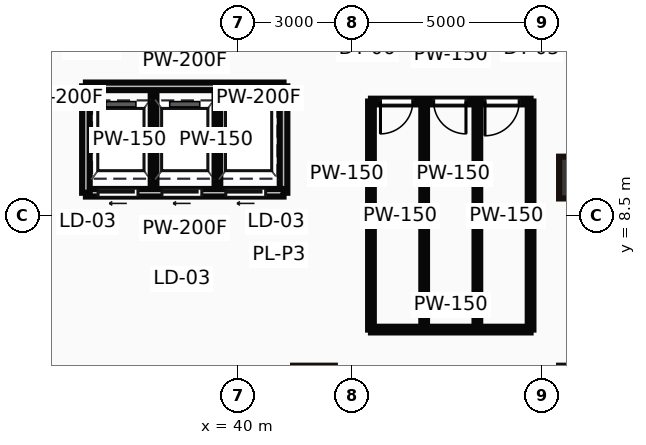
"""IFC4 building model, lengths in metres.
Left out: names, types, materials, properties, quantities, classifications, styles, units other than length and angle.
Written with IfcOpenShell. Run it as: python <this file> out.ifc"""

import sys

from ifc_helpers import new_model, si_unit, direction, frame, frame_2d, origin, origin_2d, place, context, subcontext, project, spatial, rectangle, hollow_rectangle, extrude, source, transform, mapped, element, fill, save


model = new_model("IFC4")
c1 = context("Model", 3, precision=1e-05, world=origin(), true_north=direction((0.0, 1.0)))
c2 = subcontext(c1, "Body", "Model", "MODEL_VIEW")
j1 = project(units=[si_unit("LENGTHUNIT", "METRE"), si_unit("PLANEANGLEUNIT", "RADIAN")], contexts=[c1])
p1 = place(None, origin())
s1 = spatial("IfcSite", under=j1, at=p1, CompositionType="ELEMENT")
p2 = place(p1, origin())
s2 = spatial("IfcBuilding", under=s1, at=p2, CompositionType="ELEMENT")
p3 = place(p2, frame((0.0, 0.0, 21.0)))
s3 = spatial("IfcBuildingStorey", under=s2, at=p3, CompositionType="ELEMENT", Elevation=21.0)
m1 = source(origin(), c2, "Body", "SweptSolid", [
    extrude(hollow_rectangle(XDim=1.1, YDim=1.1, WallThickness=0.05, at=origin_2d()), origin(), (0.0, 0.0, 1.0), 5.0),
])
p4 = place(p3, frame((49.0, 9.5, 0.0), z_axis=(0.0, 0.0, 1.0), x_axis=(1.0, 0.0, 0.0)))
e1 = element("IfcColumn", 1, at=p4, inside=s3, PredefinedType="PILASTER", context=c2, shape_type="MappedRepresentation", body=[
    mapped(m1, transform((0.0, 0.0, 0.0))),
])
m2 = source(origin(), c2, "Body", "SweptSolid", [
    extrude(rectangle(XDim=5.2, YDim=0.2, at=frame_2d((2.6, 0.0))), origin(), (0.0, 0.0, 1.0), 4.7),
])
p5 = place(p3, frame((36.0, 9.1, 0.0), z_axis=(0.0, 0.0, 1.0), x_axis=(1.0, 0.0, 0.0)))
e2 = element("IfcWall", 2, at=p5, inside=s3, PredefinedType="PARTITIONING", context=c2, shape_type="MappedRepresentation", body=[
    mapped(m2, transform((0.0, 0.0, 0.0))),
])
p6 = place(p5, frame((0.32, 0.0, 0.0)))
e3 = element("IfcOpeningElement", 3, at=p6, cuts=e2, PredefinedType="OPENING", context=c2, shape_type="SweptSolid", body=[
    extrude(rectangle(XDim=1.05, YDim=2.15, at=frame_2d((0.525, 1.075))), frame((0.0, 0.11, 0.0), z_axis=(0.0, -1.0, 0.0), x_axis=(1.0, 0.0, 0.0)), (0.0, 0.0, 1.0), 0.22),
])
p7 = place(p5, frame((2.0, 0.0, 0.0)))
e4 = element("IfcOpeningElement", 4, at=p7, cuts=e2, PredefinedType="OPENING", context=c2, shape_type="SweptSolid", body=[
    extrude(rectangle(XDim=1.05, YDim=2.15, at=frame_2d((0.525, 1.075))), frame((0.0, 0.11, 0.0), z_axis=(0.0, -1.0, 0.0), x_axis=(1.0, 0.0, 0.0)), (0.0, 0.0, 1.0), 0.22),
])
p8 = place(p5, frame((3.68, 0.0, 0.0)))
e5 = element("IfcOpeningElement", 5, at=p8, cuts=e2, PredefinedType="OPENING", context=c2, shape_type="SweptSolid", body=[
    extrude(rectangle(XDim=1.05, YDim=2.15, at=frame_2d((0.525, 1.075))), frame((0.0, 0.11, 0.0), z_axis=(0.0, -1.0, 0.0), x_axis=(1.0, 0.0, 0.0)), (0.0, 0.0, 1.0), 0.22),
])
p9 = place(p3, frame((36.0, 11.9, 0.0), z_axis=(0.0, 0.0, 1.0), x_axis=(1.0, 0.0, 0.0)))
e6 = element("IfcWall", 6, at=p9, inside=s3, PredefinedType="PARTITIONING", context=c2, shape_type="MappedRepresentation", body=[
    mapped(m2, transform((0.0, 0.0, 0.0))),
])
m3 = source(origin(), c2, "Body", "SweptSolid", [
    extrude(rectangle(XDim=2.8, YDim=0.2, at=frame_2d((1.4, 0.0))), origin(), (0.0, 0.0, 1.0), 4.7),
])
for number, where, z_axis, x_axis in (
    (7, (36.0, 9.1, 0.0), (0.0, 0.0, 1.0), (0.0, 1.0, 0.0)),
    (8, (41.2, 9.1, 0.0), (0.0, 0.0, 1.0), (0.0, 1.0, 0.0)),
):
    element("IfcWall", number, at=place(p3, frame(where, z_axis=z_axis, x_axis=x_axis)), inside=s3, PredefinedType="PARTITIONING", context=c2, shape_type="MappedRepresentation", body=[
        mapped(m3, transform((0.0, 0.0, 0.0))),
    ])
m4 = source(origin(), c2, "Body", "SweptSolid", [
    extrude(rectangle(XDim=2.7, YDim=0.15, at=frame_2d((1.35, 0.0))), origin(), (0.0, 0.0, 1.0), 4.7),
])
for number, where, z_axis, x_axis in (
    (9, (37.78, 9.15, 0.0), (0.0, 0.0, 1.0), (0.0, 1.0, 0.0)),
    (10, (39.46, 9.15, 0.0), (0.0, 0.0, 1.0), (0.0, 1.0, 0.0)),
):
    element("IfcWall", number, at=place(p3, frame(where, z_axis=z_axis, x_axis=x_axis)), inside=s3, PredefinedType="PARTITIONING", context=c2, shape_type="MappedRepresentation", body=[
        mapped(m4, transform((0.0, 0.0, 0.0))),
    ])
m5 = source(origin(), c2, "Body", "SweptSolid", [
    extrude(rectangle(XDim=4.2, YDim=0.15, at=frame_2d((2.1, 0.0))), origin(), (0.0, 0.0, 1.0), 4.7),
])
p10 = place(p3, frame((43.5, 11.5, 0.0), z_axis=(0.0, 0.0, 1.0), x_axis=(1.0, 0.0, 0.0)))
e11 = element("IfcWall", 11, at=p10, inside=s3, PredefinedType="PARTITIONING", context=c2, shape_type="MappedRepresentation", body=[
    mapped(m5, transform((0.0, 0.0, 0.0))),
])
p11 = place(p10, frame((0.25, 0.0, 0.0)))
e12 = element("IfcOpeningElement", 12, at=p11, cuts=e11, PredefinedType="OPENING", context=c2, shape_type="SweptSolid", body=[
    extrude(rectangle(XDim=0.85, YDim=2.1, at=frame_2d((0.425, 1.05))), frame((0.0, 0.085, 0.0), z_axis=(0.0, -1.0, 0.0), x_axis=(1.0, 0.0, 0.0)), (0.0, 0.0, 1.0), 0.17),
])
p12 = place(p10, frame((1.65, 0.0, 0.0)))
e13 = element("IfcOpeningElement", 13, at=p12, cuts=e11, PredefinedType="OPENING", context=c2, shape_type="SweptSolid", body=[
    extrude(rectangle(XDim=0.85, YDim=2.1, at=frame_2d((0.425, 1.05))), frame((0.0, 0.085, 0.0), z_axis=(0.0, -1.0, 0.0), x_axis=(1.0, 0.0, 0.0)), (0.0, 0.0, 1.0), 0.17),
])
p13 = place(p10, frame((3.0, 0.0, 0.0)))
e14 = element("IfcOpeningElement", 14, at=p13, cuts=e11, PredefinedType="OPENING", context=c2, shape_type="SweptSolid", body=[
    extrude(rectangle(XDim=0.9, YDim=2.1, at=frame_2d((0.45, 1.05))), frame((0.0, 0.085, 0.0), z_axis=(0.0, -1.0, 0.0), x_axis=(1.0, 0.0, 0.0)), (0.0, 0.0, 1.0), 0.17),
])
p14 = place(p3, frame((43.5, 5.5, 0.0), z_axis=(0.0, 0.0, 1.0), x_axis=(1.0, 0.0, 0.0)))
e15 = element("IfcWall", 15, at=p14, inside=s3, PredefinedType="PARTITIONING", context=c2, shape_type="MappedRepresentation", body=[
    mapped(m5, transform((0.0, 0.0, 0.0))),
])
m6 = source(origin(), c2, "Body", "SweptSolid", [
    extrude(rectangle(XDim=6.0, YDim=0.15, at=frame_2d((3.0, 0.0))), origin(), (0.0, 0.0, 1.0), 4.7),
])
for number, where, z_axis, x_axis in (
    (16, (43.5, 5.5, 0.0), (0.0, 0.0, 1.0), (0.0, 1.0, 0.0)),
    (17, (47.7, 5.5, 0.0), (0.0, 0.0, 1.0), (0.0, 1.0, 0.0)),
    (18, (44.9, 5.5, 0.0), (0.0, 0.0, 1.0), (0.0, 1.0, 0.0)),
    (19, (46.3, 5.5, 0.0), (0.0, 0.0, 1.0), (0.0, 1.0, 0.0)),
):
    element("IfcWall", number, at=place(p3, frame(where, z_axis=z_axis, x_axis=x_axis)), inside=s3, PredefinedType="PARTITIONING", context=c2, shape_type="MappedRepresentation", body=[
        mapped(m6, transform((0.0, 0.0, 0.0))),
    ])
m7 = source(origin(), c2, "Body", "SweptSolid", [
    extrude(rectangle(XDim=1.05, YDim=2.15, at=frame_2d((0.525, 1.075))), frame((0.0, 0.025, 0.0), z_axis=(0.0, -1.0, 0.0), x_axis=(1.0, 0.0, 0.0)), (0.0, 0.0, 1.0), 0.05),
])
p15 = place(p6, frame((1.05, 0.0, 0.0), z_axis=(0.0, 0.0, 1.0), x_axis=(-1.0, 0.0, 0.0)))
e20 = element("IfcDoor", 20, at=p15, inside=s3, OperationType="SLIDING_TO_LEFT", PredefinedType="DOOR", context=c2, shape_type="MappedRepresentation", body=[
    mapped(m7, transform((0.0, 0.0, 0.0))),
])
fill(e3, e20)
p16 = place(p7, frame((1.05, 0.0, 0.0), z_axis=(0.0, 0.0, 1.0), x_axis=(-1.0, 0.0, 0.0)))
e21 = element("IfcDoor", 21, at=p16, inside=s3, OperationType="SLIDING_TO_LEFT", PredefinedType="DOOR", context=c2, shape_type="MappedRepresentation", body=[
    mapped(m7, transform((0.0, 0.0, 0.0))),
])
fill(e4, e21)
p17 = place(p8, frame((1.05, 0.0, 0.0), z_axis=(0.0, 0.0, 1.0), x_axis=(-1.0, 0.0, 0.0)))
e22 = element("IfcDoor", 22, at=p17, inside=s3, OperationType="SLIDING_TO_LEFT", PredefinedType="DOOR", context=c2, shape_type="MappedRepresentation", body=[
    mapped(m7, transform((0.0, 0.0, 0.0))),
])
fill(e5, e22)
m8 = source(origin(), c2, "Body", "SweptSolid", [
    extrude(rectangle(XDim=0.85, YDim=2.1, at=frame_2d((0.425, 1.05))), frame((0.0, 0.025, 0.0), z_axis=(0.0, -1.0, 0.0), x_axis=(1.0, 0.0, 0.0)), (0.0, 0.0, 1.0), 0.05),
])
p18 = place(p11, frame((0.85, 0.0, 0.0), z_axis=(0.0, 0.0, 1.0), x_axis=(-1.0, 0.0, 0.0)))
e23 = element("IfcDoor", 23, at=p18, inside=s3, OperationType="SINGLE_SWING_LEFT", PredefinedType="DOOR", context=c2, shape_type="MappedRepresentation", body=[
    mapped(m8, transform((0.0, 0.0, 0.0))),
])
fill(e12, e23)
p19 = place(p12, frame((0.85, 0.0, 0.0), z_axis=(0.0, 0.0, 1.0), x_axis=(-1.0, 0.0, 0.0)))
e24 = element("IfcDoor", 24, at=p19, inside=s3, OperationType="SINGLE_SWING_RIGHT", PredefinedType="DOOR", context=c2, shape_type="MappedRepresentation", body=[
    mapped(m8, transform((0.0, 0.0, 0.0))),
])
fill(e13, e24)
m9 = source(origin(), c2, "Body", "SweptSolid", [
    extrude(rectangle(XDim=0.9, YDim=2.1, at=frame_2d((0.45, 1.05))), frame((0.0, 0.025, 0.0), z_axis=(0.0, -1.0, 0.0), x_axis=(1.0, 0.0, 0.0)), (0.0, 0.0, 1.0), 0.05),
])
p20 = place(p13, frame((0.9, 0.0, 0.0), z_axis=(0.0, 0.0, 1.0), x_axis=(-1.0, 0.0, 0.0)))
e25 = element("IfcDoor", 25, at=p20, inside=s3, OperationType="SINGLE_SWING_LEFT", PredefinedType="DOOR", context=c2, shape_type="MappedRepresentation", body=[
    mapped(m9, transform((0.0, 0.0, 0.0))),
])
fill(e14, e25)
save(model, sys.argv[1])
